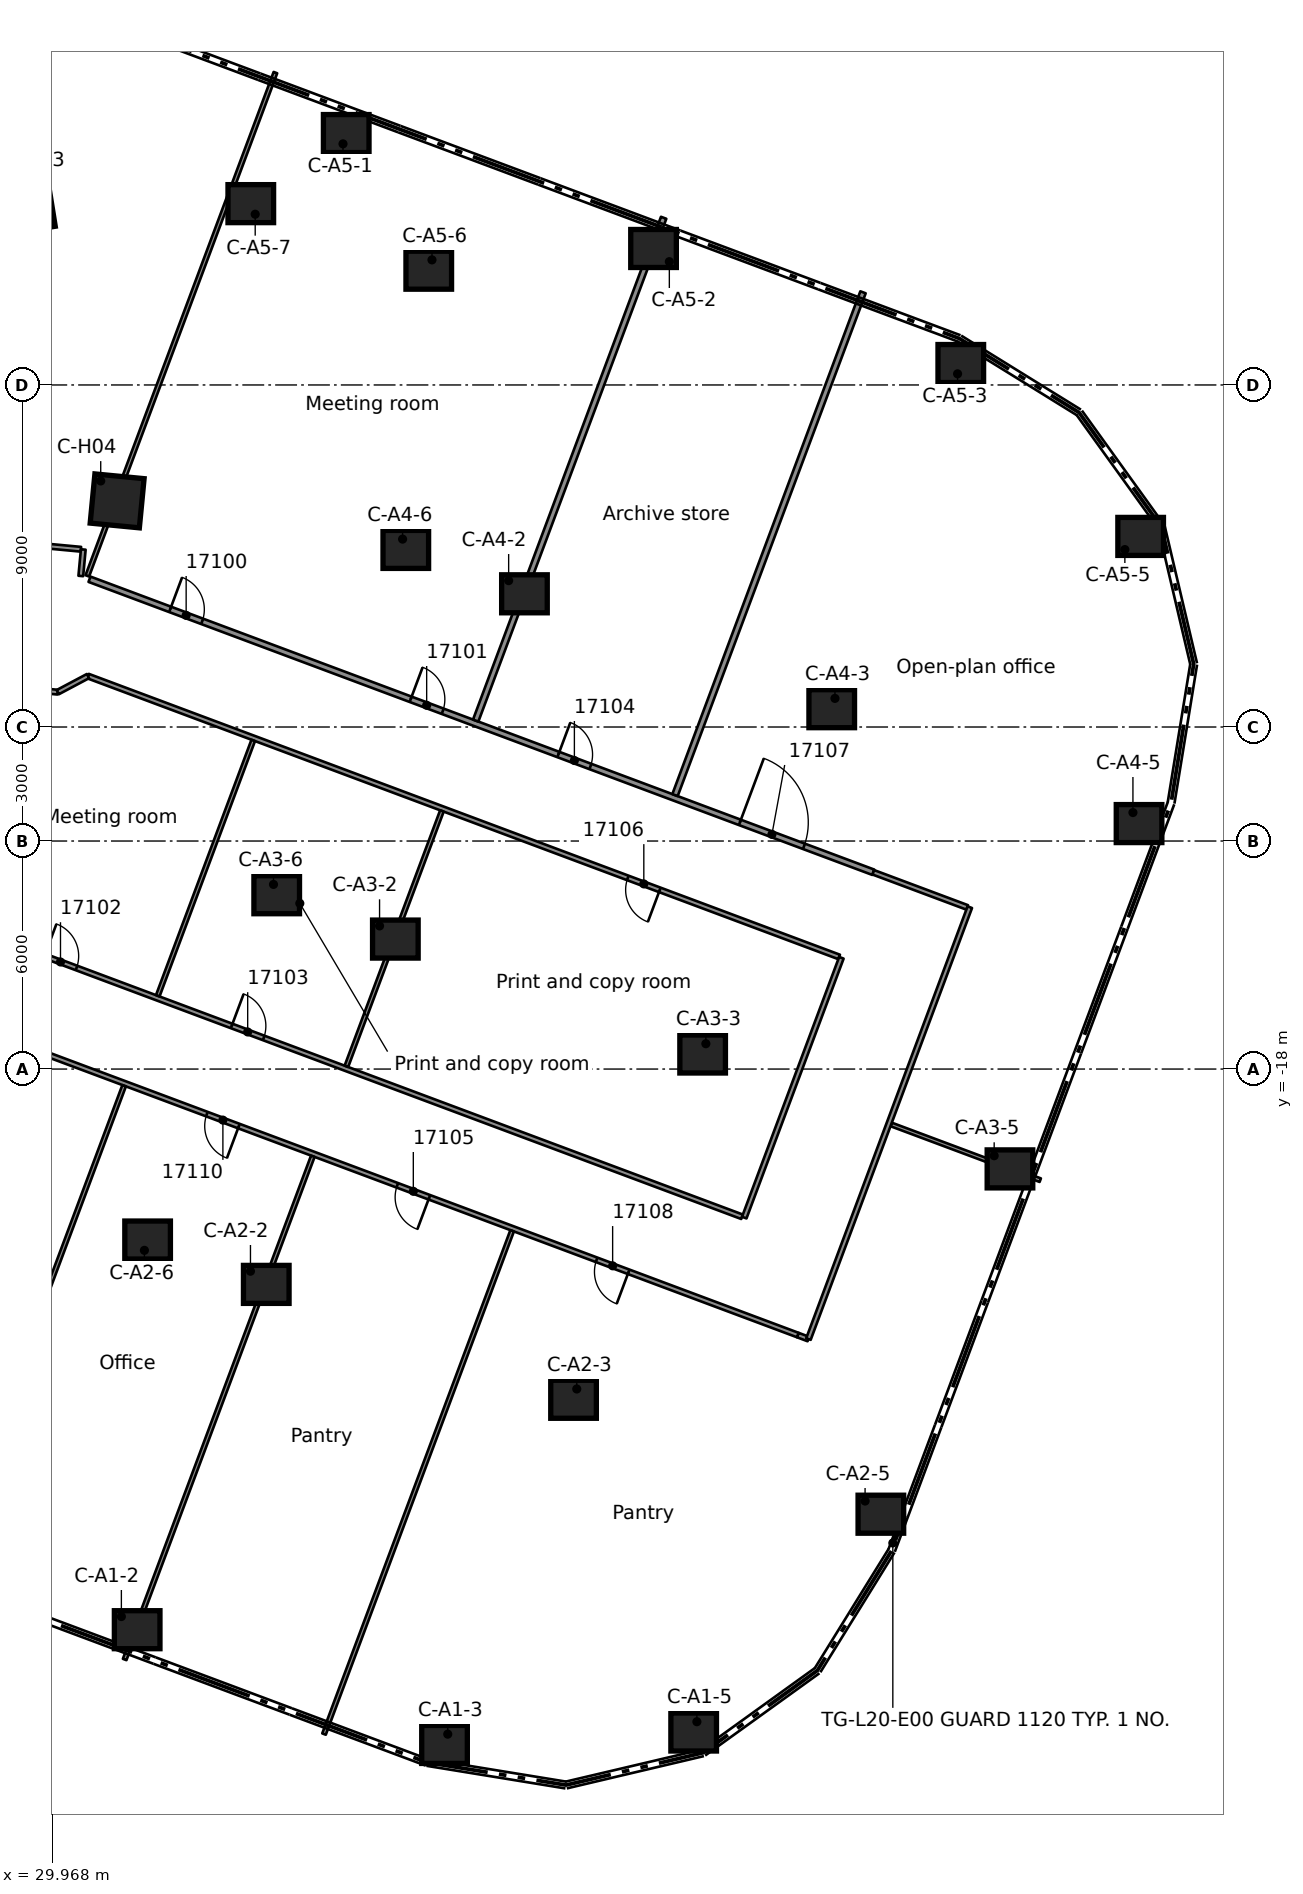
"""IFC4 building model, lengths in metres.
Left out: names, types, materials, properties, quantities, classifications, styles, units other than length and angle.
Written with IfcOpenShell. Run it as: python <this file> out.ifc"""

import sys

from ifc_helpers import new_model, si_unit, direction, frame, frame_2d, origin, origin_2d, place, context, subcontext, project, spatial, rectangle, extrude, element, fill, save


model = new_model("IFC4")
c1 = context("Model", 3, precision=1e-05, world=origin(), true_north=direction((0.0, 1.0)))
c2 = subcontext(c1, "Body", "Model", "MODEL_VIEW")
j1 = project(units=[si_unit("LENGTHUNIT", "METRE"), si_unit("PLANEANGLEUNIT", "RADIAN")], contexts=[c1])
p1 = place(None, origin())
s1 = spatial("IfcSite", under=j1, at=p1, CompositionType="ELEMENT")
p2 = place(p1, origin())
s2 = spatial("IfcBuilding", under=s1, at=p2, CompositionType="ELEMENT")
p3 = place(p2, frame((0.0, 0.0, 84.2)))
s3 = spatial("IfcBuildingStorey", under=s2, at=p3, CompositionType="ELEMENT", Elevation=84.2)
for number, where, z_axis, x_axis in (
    (1, (32.203, -32.752, 0.0), (0.0, 0.0, 1.0), (1.0, 0.0, 0.0)),
    (2, (40.291, -35.771, 0.0), (0.0, 0.0, 1.0), (1.0, 0.0, 0.0)),
    (3, (46.847, -35.444, 0.0), (0.0, 0.0, 1.0), (1.0, 0.0, 0.0)),
    (4, (35.6, -23.666, 0.0), (0.0, 0.0, 1.0), (1.0, 0.0, 0.0)),
    (5, (43.686, -26.689, 0.0), (0.0, 0.0, 1.0), (1.0, 0.0, 0.0)),
    (6, (51.773, -29.713, 0.0), (0.0, 0.0, 1.0), (1.0, 0.0, 0.0)),
    (7, (32.478, -22.499, 0.0), (0.0, 0.0, 1.0), (1.0, 0.0, 0.0)),
    (8, (38.997, -14.58, 0.0), (0.0, 0.0, 1.0), (1.0, 0.0, 0.0)),
    (9, (47.083, -17.604, 0.0), (0.0, 0.0, 1.0), (1.0, 0.0, 0.0)),
    (10, (55.17, -20.627, 0.0), (0.0, 0.0, 1.0), (1.0, 0.0, 0.0)),
    (11, (35.875, -13.413, 0.0), (0.0, 0.0, 1.0), (1.0, 0.0, 0.0)),
    (12, (42.394, -5.495, 0.0), (0.0, 0.0, 1.0), (1.0, 0.0, 0.0)),
    (13, (50.48, -8.518, 0.0), (0.0, 0.0, 1.0), (1.0, 0.0, 0.0)),
    (14, (58.567, -11.541, 0.0), (0.0, 0.0, 1.0), (1.0, 0.0, 0.0)),
    (15, (39.272, -4.327, 0.0), (0.0, 0.0, 1.0), (1.0, 0.0, 0.0)),
    (16, (37.704, 6.615, 0.0), (0.0, 0.0, 1.0), (1.0, 0.0, 0.0)),
    (17, (45.791, 3.591, 0.0), (0.0, 0.0, 1.0), (1.0, 0.0, 0.0)),
    (18, (53.876, 0.564, 0.0), (0.0, 0.0, 1.0), (1.0, 0.0, 0.0)),
    (19, (58.609, -3.985, 0.0), (0.0, 0.0, 1.0), (1.0, 0.0, 0.0)),
    (20, (39.876, 3.02, 0.0), (0.0, 0.0, 1.0), (1.0, 0.0, 0.0)),
    (21, (35.193, 4.771, 0.0), (0.0, 0.0, 1.0), (1.0, 0.0, 0.0)),
):
    element("IfcColumn", number, at=place(p3, frame(where, z_axis=z_axis, x_axis=x_axis)), inside=s3, PredefinedType="COLUMN", context=c2, shape_type="SweptSolid", body=[
        extrude(rectangle(XDim=1.2, YDim=1.0, at=origin_2d()), origin(), (0.0, 0.0, 1.0), 3.5),
    ])
for number, where, z_axis, x_axis in (
    (22, (29.302, 4.714, 0.0), (0.0, 0.0, 1.0), (0.987, 0.159, 0.0)),
    (23, (31.676, -3.05, 0.0), (0.0, 0.0, 1.0), (0.995, -0.096, 0.0)),
):
    element("IfcColumn", number, at=place(p3, frame(where, z_axis=z_axis, x_axis=x_axis)), inside=s3, PredefinedType="COLUMN", context=c2, shape_type="SweptSolid", body=[
        extrude(rectangle(XDim=1.3, YDim=1.3, at=origin_2d()), origin(), (0.0, 0.0, 1.0), 3.5),
    ])
p4 = place(p3, frame((49.587, -24.999, 0.0), z_axis=(0.0, 0.0, 1.0), x_axis=(0.93595848705, -0.352110366957, 0.0)))
e24 = element("IfcWall", 24, at=p4, inside=s3, PredefinedType="PARTITIONING", context=c2, shape_type="SweptSolid", body=[
    extrude(rectangle(XDim=0.298, YDim=0.125, at=frame_2d((0.149, 0.0))), origin(), (0.0, 0.0, 1.0), 3.08),
])
p5 = place(p3, frame((49.587, -24.999, 0.0), z_axis=(0.0, 0.0, 1.0), x_axis=(-0.936679277277, 0.350188422882, 0.0)))
e25 = element("IfcWall", 25, at=p5, inside=s3, PredefinedType="PARTITIONING", context=c2, shape_type="SweptSolid", body=[
    extrude(rectangle(XDim=24.413, YDim=0.125, at=frame_2d((12.207, 0.0))), origin(), (0.0, 0.0, 1.0), 3.08),
])
p6 = place(p5, frame((10.351, 0.0, 0.0)))
e26 = element("IfcOpeningElement", 26, at=p6, cuts=e25, PredefinedType="OPENING", context=c2, shape_type="SweptSolid", body=[
    extrude(rectangle(XDim=0.9, YDim=2.1, at=frame_2d((0.45, 1.05))), frame((0.0, 0.073, 0.0), z_axis=(0.0, -1.0, 0.0), x_axis=(1.0, 0.0, 0.0)), (0.0, 0.0, 1.0), 0.145),
])
p7 = place(p5, frame((4.752, 0.0, 0.0)))
e27 = element("IfcOpeningElement", 27, at=p7, cuts=e25, PredefinedType="OPENING", context=c2, shape_type="SweptSolid", body=[
    extrude(rectangle(XDim=0.9, YDim=2.1, at=frame_2d((0.45, 1.05))), frame((0.0, 0.073, 0.0), z_axis=(0.0, -1.0, 0.0), x_axis=(1.0, 0.0, 0.0)), (0.0, 0.0, 1.0), 0.145),
])
p8 = place(p5, frame((21.251, 0.0, 0.0)))
e28 = element("IfcOpeningElement", 28, at=p8, cuts=e25, PredefinedType="OPENING", context=c2, shape_type="SweptSolid", body=[
    extrude(rectangle(XDim=0.9, YDim=2.1, at=frame_2d((0.45, 1.05))), frame((0.0, 0.073, 0.0), z_axis=(0.0, -1.0, 0.0), x_axis=(1.0, 0.0, 0.0)), (0.0, 0.0, 1.0), 0.145),
])
p9 = place(p5, frame((15.701, 0.0, 0.0)))
e29 = element("IfcOpeningElement", 29, at=p9, cuts=e25, PredefinedType="OPENING", context=c2, shape_type="SweptSolid", body=[
    extrude(rectangle(XDim=0.9, YDim=2.1, at=frame_2d((0.45, 1.05))), frame((0.0, 0.073, 0.0), z_axis=(0.0, -1.0, 0.0), x_axis=(1.0, 0.0, 0.0)), (0.0, 0.0, 1.0), 0.145),
])
p10 = place(p3, frame((28.277, -14.469, 0.0), z_axis=(0.0, 0.0, 1.0), x_axis=(0.936688160915, -0.350164660128, 0.0)))
e30 = element("IfcWall", 30, at=p10, inside=s3, PredefinedType="PARTITIONING", context=c2, shape_type="SweptSolid", body=[
    extrude(rectangle(XDim=21.184, YDim=0.125, at=frame_2d((10.592, 0.0))), origin(), (0.0, 0.0, 1.0), 3.08),
])
p11 = place(p10, frame((1.587, 0.0, 0.0)))
e31 = element("IfcOpeningElement", 31, at=p11, cuts=e30, PredefinedType="OPENING", context=c2, shape_type="SweptSolid", body=[
    extrude(rectangle(XDim=0.9, YDim=2.1, at=frame_2d((0.45, 1.05))), frame((0.0, 0.073, 0.0), z_axis=(0.0, -1.0, 0.0), x_axis=(1.0, 0.0, 0.0)), (0.0, 0.0, 1.0), 0.145),
])
p12 = place(p10, frame((6.846, 0.0, 0.0)))
e32 = element("IfcOpeningElement", 32, at=p12, cuts=e30, PredefinedType="OPENING", context=c2, shape_type="SweptSolid", body=[
    extrude(rectangle(XDim=0.9, YDim=2.1, at=frame_2d((0.45, 1.05))), frame((0.0, 0.073, 0.0), z_axis=(0.0, -1.0, 0.0), x_axis=(1.0, 0.0, 0.0)), (0.0, 0.0, 1.0), 0.145),
])
p13 = place(p3, frame((52.045, -19.458, 0.0), z_axis=(0.0, 0.0, 1.0), x_axis=(0.936700060605, -0.350132826886, 0.0)))
e33 = element("IfcWall", 33, at=p13, inside=s3, PredefinedType="PARTITIONING", context=c2, shape_type="SweptSolid", body=[
    extrude(rectangle(XDim=4.187, YDim=0.1, at=frame_2d((2.094, 0.0))), origin(), (0.0, 0.0, 1.0), 3.08),
])
p14 = place(p3, frame((50.675, -15.05, 0.0), z_axis=(0.0, 0.0, 1.0), x_axis=(-0.936673902411, 0.350202799165, 0.0)))
e34 = element("IfcWall", 34, at=p14, inside=s3, PredefinedType="PARTITIONING", context=c2, shape_type="SweptSolid", body=[
    extrude(rectangle(XDim=21.103, YDim=0.125, at=frame_2d((10.551, 0.0))), origin(), (0.0, 0.0, 1.0), 3.08),
])
p15 = place(p14, frame((5.037, 0.0, 0.0)))
e35 = element("IfcOpeningElement", 35, at=p15, cuts=e34, PredefinedType="OPENING", context=c2, shape_type="SweptSolid", body=[
    extrude(rectangle(XDim=0.9, YDim=2.1, at=frame_2d((0.45, 1.05))), frame((0.0, 0.073, 0.0), z_axis=(0.0, -1.0, 0.0), x_axis=(1.0, 0.0, 0.0)), (0.0, 0.0, 1.0), 0.145),
])
p16 = place(p3, frame((30.949, -5.112, 0.0), z_axis=(0.0, 0.0, 1.0), x_axis=(0.936693201773, -0.350151175568, 0.0)))
e36 = element("IfcWall", 36, at=p16, inside=s3, PredefinedType="PARTITIONING", context=c2, shape_type="SweptSolid", body=[
    extrude(rectangle(XDim=22.019, YDim=0.15, at=frame_2d((11.01, 0.0))), origin(), (0.0, 0.0, 1.0), 3.08),
])
p17 = place(p16, frame((2.265, 0.0, 0.0)))
e37 = element("IfcOpeningElement", 37, at=p17, cuts=e36, PredefinedType="OPENING", context=c2, shape_type="SweptSolid", body=[
    extrude(rectangle(XDim=0.9, YDim=2.1, at=frame_2d((0.45, 1.05))), frame((0.0, 0.085, 0.0), z_axis=(0.0, -1.0, 0.0), x_axis=(1.0, 0.0, 0.0)), (0.0, 0.0, 1.0), 0.17),
])
p18 = place(p16, frame((9.021, 0.0, 0.0)))
e38 = element("IfcOpeningElement", 38, at=p18, cuts=e36, PredefinedType="OPENING", context=c2, shape_type="SweptSolid", body=[
    extrude(rectangle(XDim=0.9, YDim=2.1, at=frame_2d((0.45, 1.05))), frame((0.0, 0.085, 0.0), z_axis=(0.0, -1.0, 0.0), x_axis=(1.0, 0.0, 0.0)), (0.0, 0.0, 1.0), 0.17),
])
p19 = place(p16, frame((13.171, 0.0, 0.0)))
e39 = element("IfcOpeningElement", 39, at=p19, cuts=e36, PredefinedType="OPENING", context=c2, shape_type="SweptSolid", body=[
    extrude(rectangle(XDim=0.9, YDim=2.1, at=frame_2d((0.45, 1.05))), frame((0.0, 0.085, 0.0), z_axis=(0.0, -1.0, 0.0), x_axis=(1.0, 0.0, 0.0)), (0.0, 0.0, 1.0), 0.17),
])
p20 = place(p16, frame((18.271, 0.0, 0.0)))
e40 = element("IfcOpeningElement", 40, at=p20, cuts=e36, PredefinedType="OPENING", context=c2, shape_type="SweptSolid", body=[
    extrude(rectangle(XDim=1.8, YDim=2.1, at=frame_2d((0.9, 1.05))), frame((0.0, 0.085, 0.0), z_axis=(0.0, -1.0, 0.0), x_axis=(1.0, 0.0, 0.0)), (0.0, 0.0, 1.0), 0.17),
])
p21 = place(p3, frame((54.045, -13.747, 0.0), z_axis=(0.0, 0.0, 1.0), x_axis=(-0.936644465202, 0.350281523643, 0.0)))
e41 = element("IfcWall", 41, at=p21, inside=s3, PredefinedType="PARTITIONING", context=c2, shape_type="SweptSolid", body=[
    extrude(rectangle(XDim=2.638, YDim=0.125, at=frame_2d((1.319, 0.0))), origin(), (0.0, 0.0, 1.0), 3.08),
])
p22 = place(p3, frame((21.512, -3.459, 0.0), z_axis=(0.0, 0.0, 1.0), x_axis=(0.995629319732, -0.093393028057, 0.0)))
e42 = element("IfcWall", 42, at=p22, inside=s3, PredefinedType="PARTITIONING", context=c2, shape_type="SweptSolid", body=[
    extrude(rectangle(XDim=9.251, YDim=0.125, at=frame_2d((4.626, 0.0))), origin(), (0.0, 0.0, 1.0), 3.08),
])
p23 = place(p3, frame((29.759, -8.05, 0.0), z_axis=(0.0, 0.0, 1.0), x_axis=(0.995670146901, -0.092956756453, 0.0)))
e43 = element("IfcWall", 43, at=p23, inside=s3, PredefinedType="PARTITIONING", context=c2, shape_type="SweptSolid", body=[
    extrude(rectangle(XDim=0.354, YDim=0.125, at=frame_2d((0.177, 0.0))), origin(), (0.0, 0.0, 1.0), 3.08),
])
p24 = place(p3, frame((49.867, -25.104, 0.0), z_axis=(0.0, 0.0, 1.0), x_axis=(0.350035835617, 0.936736309632, 0.0)))
e44 = element("IfcWall", 44, at=p24, inside=s3, PredefinedType="PARTITIONING", context=c2, shape_type="SweptSolid", body=[
    extrude(rectangle(XDim=12.13, YDim=0.125, at=frame_2d((6.065, 0.0))), origin(), (0.0, 0.0, 1.0), 3.08),
])
p25 = place(p3, frame((48.178, -21.909, 0.0), z_axis=(0.0, 0.0, 1.0), x_axis=(0.350170212359, 0.93668608529, 0.0)))
e45 = element("IfcWall", 45, at=p25, inside=s3, PredefinedType="PARTITIONING", context=c2, shape_type="SweptSolid", body=[
    extrude(rectangle(XDim=7.299, YDim=0.125, at=frame_2d((3.649, 0.0))), origin(), (0.0, 0.0, 1.0), 3.08),
])
p26 = place(p3, frame((37.12, -35.498, 0.0), z_axis=(0.0, 0.0, 1.0), x_axis=(0.350144786727, 0.936695590001, 0.0)))
e46 = element("IfcWall", 46, at=p26, inside=s3, PredefinedType="PARTITIONING", context=c2, shape_type="SweptSolid", body=[
    extrude(rectangle(XDim=14.137, YDim=0.1, at=frame_2d((7.068, 0.0))), origin(), (0.0, 0.0, 1.0), 3.08),
])
p27 = place(p3, frame((46.356, -10.792, 0.0), z_axis=(0.0, 0.0, 1.0), x_axis=(0.350240580202, 0.936659776002, 0.0)))
e47 = element("IfcWall", 47, at=p27, inside=s3, PredefinedType="PARTITIONING", context=c2, shape_type="SweptSolid", body=[
    extrude(rectangle(XDim=14.125, YDim=0.15, at=frame_2d((7.062, 0.0))), origin(), (0.0, 0.0, 1.0), 3.08),
])
p28 = place(p3, frame((31.874, -33.536, 0.0), z_axis=(0.0, 0.0, 1.0), x_axis=(0.350228055147, 0.936664459338, 0.0)))
e48 = element("IfcWall", 48, at=p28, inside=s3, PredefinedType="PARTITIONING", context=c2, shape_type="SweptSolid", body=[
    extrude(rectangle(XDim=14.136, YDim=0.1, at=frame_2d((7.068, 0.0))), origin(), (0.0, 0.0, 1.0), 3.08),
])
p29 = place(p3, frame((37.709, -17.928, 0.0), z_axis=(0.0, 0.0, 1.0), x_axis=(0.350306504713, 0.93663512253, 0.0)))
e49 = element("IfcWall", 49, at=p29, inside=s3, PredefinedType="PARTITIONING", context=c2, shape_type="SweptSolid", body=[
    extrude(rectangle(XDim=7.174, YDim=0.1, at=frame_2d((3.587, 0.0))), origin(), (0.0, 0.0, 1.0), 3.08),
])
p30 = place(p3, frame((41.111, -8.831, 0.0), z_axis=(0.0, 0.0, 1.0), x_axis=(0.350164754545, 0.936688125618, 0.0)))
e50 = element("IfcWall", 50, at=p30, inside=s3, PredefinedType="PARTITIONING", context=c2, shape_type="SweptSolid", body=[
    extrude(rectangle(XDim=14.124, YDim=0.15, at=frame_2d((7.062, 0.0))), origin(), (0.0, 0.0, 1.0), 3.08),
])
p31 = place(p3, frame((26.91, -31.68, 0.0), z_axis=(0.0, 0.0, 1.0), x_axis=(0.350182597647, 0.936681455088, 0.0)))
e51 = element("IfcWall", 51, at=p31, inside=s3, PredefinedType="PARTITIONING", context=c2, shape_type="SweptSolid", body=[
    extrude(rectangle(XDim=14.136, YDim=0.1, at=frame_2d((7.068, 0.0))), origin(), (0.0, 0.0, 1.0), 3.08),
])
p32 = place(p3, frame((32.745, -16.072, 0.0), z_axis=(0.0, 0.0, 1.0), x_axis=(0.350187067912, 0.936679783847, 0.0)))
e52 = element("IfcWall", 52, at=p32, inside=s3, PredefinedType="PARTITIONING", context=c2, shape_type="SweptSolid", body=[
    extrude(rectangle(XDim=7.173, YDim=0.1, at=frame_2d((3.586, 0.0))), origin(), (0.0, 0.0, 1.0), 3.08),
])
p33 = place(p3, frame((30.891, -5.023, 0.0), z_axis=(0.0, 0.0, 1.0), x_axis=(0.350144786727, 0.936695590001, 0.0)))
e53 = element("IfcWall", 53, at=p33, inside=s3, PredefinedType="PARTITIONING", context=c2, shape_type="SweptSolid", body=[
    extrude(rectangle(XDim=14.137, YDim=0.1, at=frame_2d((7.068, 0.0))), origin(), (0.0, 0.0, 1.0), 3.08),
])
p34 = place(p3, frame((30.72, -5.026, 0.0), z_axis=(0.0, 0.0, 1.0), x_axis=(0.092800329534, 0.995684738679, 0.0)))
e54 = element("IfcWall", 54, at=p34, inside=s3, PredefinedType="PARTITIONING", context=c2, shape_type="SweptSolid", body=[
    extrude(rectangle(XDim=0.7, YDim=0.125, at=frame_2d((0.35, 0.0))), origin(), (0.0, 0.0, 1.0), 3.08),
])
p35 = place(p3, frame((30.113, -8.083, 0.0), z_axis=(0.0, 0.0, 1.0), x_axis=(0.882989439454, 0.469392852323, 0.0)))
e55 = element("IfcWall", 55, at=p35, inside=s3, PredefinedType="PARTITIONING", context=c2, shape_type="SweptSolid", body=[
    extrude(rectangle(XDim=0.901, YDim=0.125, at=frame_2d((0.451, 0.0))), origin(), (0.0, 0.0, 1.0), 3.08),
])
p36 = place(p17, origin())
e56 = element("IfcDoor", 56, at=p36, inside=s3, OperationType="SINGLE_SWING_LEFT", PredefinedType="DOOR", context=c2, shape_type="SweptSolid", body=[
    extrude(rectangle(XDim=0.9, YDim=2.1, at=frame_2d((0.45, 1.05))), frame((0.0, 0.025, 0.0), z_axis=(0.0, -1.0, 0.0), x_axis=(1.0, 0.0, 0.0)), (0.0, 0.0, 1.0), 0.05),
])
fill(e37, e56)
p37 = place(p18, origin())
e57 = element("IfcDoor", 57, at=p37, inside=s3, OperationType="SINGLE_SWING_LEFT", PredefinedType="DOOR", context=c2, shape_type="SweptSolid", body=[
    extrude(rectangle(XDim=0.9, YDim=2.1, at=frame_2d((0.45, 1.05))), frame((0.0, 0.025, 0.0), z_axis=(0.0, -1.0, 0.0), x_axis=(1.0, 0.0, 0.0)), (0.0, 0.0, 1.0), 0.05),
])
fill(e38, e57)
p38 = place(p11, origin())
e58 = element("IfcDoor", 58, at=p38, inside=s3, OperationType="SINGLE_SWING_LEFT", PredefinedType="DOOR", context=c2, shape_type="SweptSolid", body=[
    extrude(rectangle(XDim=0.9, YDim=2.1, at=frame_2d((0.45, 1.05))), frame((0.0, 0.025, 0.0), z_axis=(0.0, -1.0, 0.0), x_axis=(1.0, 0.0, 0.0)), (0.0, 0.0, 1.0), 0.05),
])
fill(e31, e58)
p39 = place(p12, origin())
e59 = element("IfcDoor", 59, at=p39, inside=s3, OperationType="SINGLE_SWING_LEFT", PredefinedType="DOOR", context=c2, shape_type="SweptSolid", body=[
    extrude(rectangle(XDim=0.9, YDim=2.1, at=frame_2d((0.45, 1.05))), frame((0.0, 0.025, 0.0), z_axis=(0.0, -1.0, 0.0), x_axis=(1.0, 0.0, 0.0)), (0.0, 0.0, 1.0), 0.05),
])
fill(e32, e59)
p40 = place(p19, origin())
e60 = element("IfcDoor", 60, at=p40, inside=s3, OperationType="SINGLE_SWING_RIGHT", PredefinedType="DOOR", context=c2, shape_type="SweptSolid", body=[
    extrude(rectangle(XDim=0.9, YDim=2.1, at=frame_2d((0.45, 1.05))), frame((0.0, 0.025, 0.0), z_axis=(0.0, -1.0, 0.0), x_axis=(1.0, 0.0, 0.0)), (0.0, 0.0, 1.0), 0.05),
])
fill(e39, e60)
p41 = place(p6, origin())
e61 = element("IfcDoor", 61, at=p41, inside=s3, OperationType="SINGLE_SWING_LEFT", PredefinedType="DOOR", context=c2, shape_type="SweptSolid", body=[
    extrude(rectangle(XDim=0.9, YDim=2.1, at=frame_2d((0.45, 1.05))), frame((0.0, 0.025, 0.0), z_axis=(0.0, -1.0, 0.0), x_axis=(1.0, 0.0, 0.0)), (0.0, 0.0, 1.0), 0.05),
])
fill(e26, e61)
p42 = place(p15, origin())
e62 = element("IfcDoor", 62, at=p42, inside=s3, OperationType="SINGLE_SWING_LEFT", PredefinedType="DOOR", context=c2, shape_type="SweptSolid", body=[
    extrude(rectangle(XDim=0.9, YDim=2.1, at=frame_2d((0.45, 1.05))), frame((0.0, 0.025, 0.0), z_axis=(0.0, -1.0, 0.0), x_axis=(1.0, 0.0, 0.0)), (0.0, 0.0, 1.0), 0.05),
])
fill(e35, e62)
p43 = place(p20, origin())
e63 = element("IfcDoor", 63, at=p43, inside=s3, OperationType="DOUBLE_DOOR_SINGLE_SWING", PredefinedType="DOOR", context=c2, shape_type="SweptSolid", body=[
    extrude(rectangle(XDim=1.8, YDim=2.1, at=frame_2d((0.9, 1.05))), frame((0.0, 0.025, 0.0), z_axis=(0.0, -1.0, 0.0), x_axis=(1.0, 0.0, 0.0)), (0.0, 0.0, 1.0), 0.05),
])
fill(e40, e63)
p44 = place(p7, origin())
e64 = element("IfcDoor", 64, at=p44, inside=s3, OperationType="SINGLE_SWING_LEFT", PredefinedType="DOOR", context=c2, shape_type="SweptSolid", body=[
    extrude(rectangle(XDim=0.9, YDim=2.1, at=frame_2d((0.45, 1.05))), frame((0.0, 0.025, 0.0), z_axis=(0.0, -1.0, 0.0), x_axis=(1.0, 0.0, 0.0)), (0.0, 0.0, 1.0), 0.05),
])
fill(e27, e64)
p45 = place(p9, origin())
e65 = element("IfcDoor", 65, at=p45, inside=s3, OperationType="SINGLE_SWING_RIGHT", PredefinedType="DOOR", context=c2, shape_type="SweptSolid", body=[
    extrude(rectangle(XDim=0.9, YDim=2.1, at=frame_2d((0.45, 1.05))), frame((0.0, 0.025, 0.0), z_axis=(0.0, -1.0, 0.0), x_axis=(1.0, 0.0, 0.0)), (0.0, 0.0, 1.0), 0.05),
])
fill(e29, e65)
save(model, sys.argv[1])
